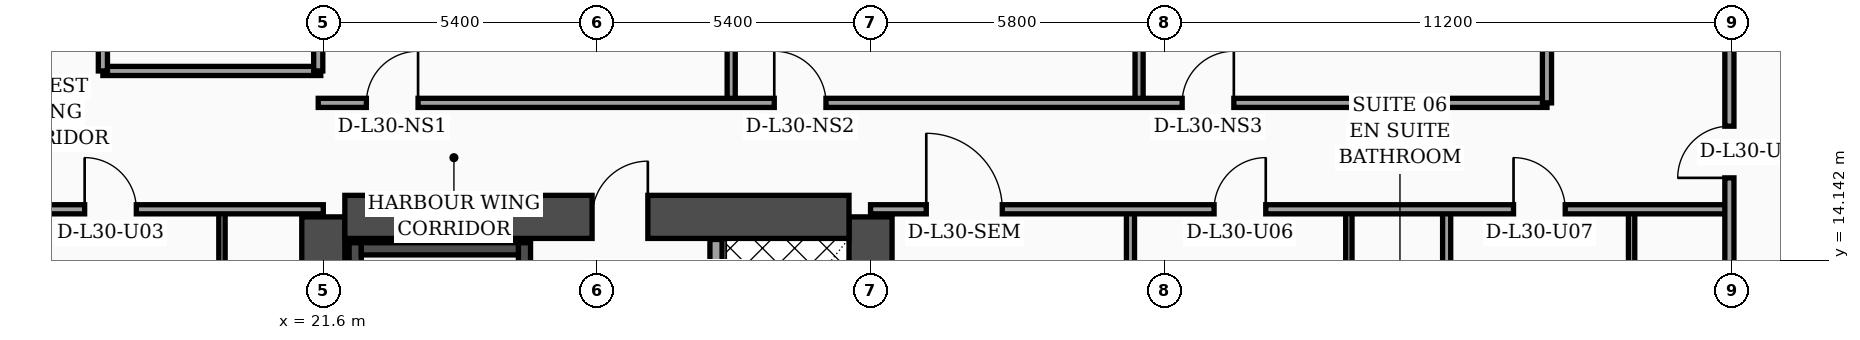
"""IFC4 building model, lengths in metres.
Left out: names, types, materials, properties, quantities, classifications, styles, units other than length and angle.
Written with IfcOpenShell. Run it as: python <this file> out.ifc"""

import sys

from ifc_helpers import new_model, si_unit, direction, frame, frame_2d, origin, place, context, subcontext, project, spatial, rectangle, extrude, element, fill, save


model = new_model("IFC4")
c1 = context("Model", 3, precision=1e-05, world=origin(), true_north=direction((0.0, 1.0)))
c2 = subcontext(c1, "Body", "Model", "MODEL_VIEW")
j1 = project(units=[si_unit("LENGTHUNIT", "METRE"), si_unit("PLANEANGLEUNIT", "RADIAN")], contexts=[c1])
p1 = place(None, origin())
s1 = spatial("IfcSite", under=j1, at=p1, CompositionType="ELEMENT")
p2 = place(p1, origin())
s2 = spatial("IfcBuilding", under=s1, at=p2, CompositionType="ELEMENT")
p3 = place(p2, frame((0.0, 0.0, 124.0)))
s3 = spatial("IfcBuildingStorey", under=s2, at=p3, CompositionType="ELEMENT", Elevation=124.0)
for number, where, z_axis, x_axis in (
    (1, (21.6, 4.6, 0.0), (0.0, 0.0, 1.0), (0.0, 1.0, 0.0)),
    (2, (32.4, 4.6, 0.0), (0.0, 0.0, 1.0), (0.0, 1.0, 0.0)),
):
    element("IfcWall", number, at=place(p3, frame(where, z_axis=z_axis, x_axis=x_axis)), inside=s3, PredefinedType="SHEAR", context=c2, shape_type="SweptSolid", body=[
        extrude(rectangle(XDim=10.4, YDim=0.85, at=frame_2d((5.2, 0.0))), origin(), (0.0, 0.0, 1.0), 3.56),
    ])
p4 = place(p3, frame((22.025, 15.0, 0.0), z_axis=(0.0, 0.0, 1.0), x_axis=(1.0, 0.0, 0.0)))
e3 = element("IfcWall", 3, at=p4, inside=s3, PredefinedType="SHEAR", context=c2, shape_type="SweptSolid", body=[
    extrude(rectangle(XDim=9.95, YDim=0.85, at=frame_2d((4.975, 0.0))), origin(), (0.0, 0.0, 1.0), 3.56),
])
p5 = place(p4, frame((4.88, 0.0, 0.0)))
e4 = element("IfcOpeningElement", 4, at=p5, cuts=e3, PredefinedType="OPENING", context=c2, shape_type="SweptSolid", body=[
    extrude(rectangle(XDim=1.1, YDim=2.2, at=frame_2d((0.55, 1.1))), frame((0.0, 0.435, 0.0), z_axis=(0.0, -1.0, 0.0), x_axis=(1.0, 0.0, 0.0)), (0.0, 0.0, 1.0), 0.87),
])
p6 = place(p3, frame((22.23, 5.025, 0.0), z_axis=(0.0, 0.0, 1.0), x_axis=(0.0, 1.0, 0.0)))
e5 = element("IfcWall", 5, at=p6, inside=s3, PredefinedType="SOLIDWALL", context=c2, shape_type="SweptSolid", body=[
    extrude(rectangle(XDim=9.465, YDim=0.24, at=frame_2d((4.732, 0.0))), origin(), (0.0, 0.0, 1.0), 3.56),
])
p7 = place(p3, frame((25.57, 5.025, 0.0), z_axis=(0.0, 0.0, 1.0), x_axis=(0.0, 1.0, 0.0)))
e6 = element("IfcWall", 6, at=p7, inside=s3, PredefinedType="SOLIDWALL", context=c2, shape_type="SweptSolid", body=[
    extrude(rectangle(XDim=9.465, YDim=0.24, at=frame_2d((4.732, 0.0))), origin(), (0.0, 0.0, 1.0), 3.56),
])
p8 = place(p7, frame((0.35, 0.0, 0.0)))
e7 = element("IfcOpeningElement", 7, at=p8, cuts=e6, PredefinedType="OPENING", context=c2, shape_type="SweptSolid", body=[
    extrude(rectangle(XDim=1.15, YDim=2.2, at=frame_2d((0.575, 1.1))), frame((0.0, 0.13, 0.0), z_axis=(0.0, -1.0, 0.0), x_axis=(1.0, 0.0, 0.0)), (0.0, 0.0, 1.0), 0.26),
])
p9 = place(p3, frame((22.35, 14.37, 0.0), z_axis=(0.0, 0.0, 1.0), x_axis=(1.0, 0.0, 0.0)))
e8 = element("IfcWall", 8, at=p9, inside=s3, PredefinedType="SOLIDWALL", context=c2, shape_type="SweptSolid", body=[
    extrude(rectangle(XDim=3.1, YDim=0.24, at=frame_2d((1.55, 0.0))), origin(), (0.0, 0.0, 1.0), 3.56),
])
p10 = place(p3, frame((59.23, 5.505, 0.0), z_axis=(0.0, 0.0, 1.0), x_axis=(-0.300509063924, 0.953778958931, 0.0)))
e9 = element("IfcWall", 9, at=p10, inside=s3, PredefinedType="SOLIDWALL", context=c2, shape_type="SweptSolid", body=[
    extrude(rectangle(XDim=30.814, YDim=0.32, at=frame_2d((15.407, 0.0))), origin(), (0.0, 0.0, 1.0), 3.56),
])
p11 = place(p10, frame((4.747, 0.0, 0.0)))
e10 = element("IfcOpeningElement", 10, at=p11, cuts=e9, PredefinedType="OPENING", context=c2, shape_type="SweptSolid", body=[
    extrude(rectangle(XDim=1.4, YDim=2.25, at=frame_2d((0.7, 1.125))), frame((0.0, 0.17, 0.0), z_axis=(0.0, -1.0, 0.0), x_axis=(1.0, 0.0, 0.0)), (0.0, 0.0, 1.0), 0.34),
])
p12 = place(p10, frame((2.65, 0.0, 0.75)))
e11 = element("IfcOpeningElement", 11, at=p12, cuts=e9, PredefinedType="OPENING", context=c2, shape_type="SweptSolid", body=[
    extrude(rectangle(XDim=1.5, YDim=1.6, at=frame_2d((0.75, 0.8))), frame((0.0, 0.17, 0.0), z_axis=(0.0, -1.0, 0.0), x_axis=(1.0, 0.0, 0.0)), (0.0, 0.0, 1.0), 0.34),
])
p13 = place(p10, frame((7.8, 0.0, 0.75)))
e12 = element("IfcOpeningElement", 12, at=p13, cuts=e9, PredefinedType="OPENING", context=c2, shape_type="SweptSolid", body=[
    extrude(rectangle(XDim=1.5, YDim=1.6, at=frame_2d((0.75, 0.8))), frame((0.0, 0.17, 0.0), z_axis=(0.0, -1.0, 0.0), x_axis=(1.0, 0.0, 0.0)), (0.0, 0.0, 1.0), 0.34),
])
p14 = place(p10, frame((10.9, 0.0, 0.75)))
e13 = element("IfcOpeningElement", 13, at=p14, cuts=e9, PredefinedType="OPENING", context=c2, shape_type="SweptSolid", body=[
    extrude(rectangle(XDim=1.5, YDim=1.6, at=frame_2d((0.75, 0.8))), frame((0.0, 0.17, 0.0), z_axis=(0.0, -1.0, 0.0), x_axis=(1.0, 0.0, 0.0)), (0.0, 0.0, 1.0), 0.34),
])
p15 = place(p10, frame((14.0, 0.0, 0.75)))
e14 = element("IfcOpeningElement", 14, at=p15, cuts=e9, PredefinedType="OPENING", context=c2, shape_type="SweptSolid", body=[
    extrude(rectangle(XDim=1.5, YDim=1.6, at=frame_2d((0.75, 0.8))), frame((0.0, 0.17, 0.0), z_axis=(0.0, -1.0, 0.0), x_axis=(1.0, 0.0, 0.0)), (0.0, 0.0, 1.0), 0.34),
])
p16 = place(p10, frame((17.1, 0.0, 0.75)))
e15 = element("IfcOpeningElement", 15, at=p16, cuts=e9, PredefinedType="OPENING", context=c2, shape_type="SweptSolid", body=[
    extrude(rectangle(XDim=1.5, YDim=1.6, at=frame_2d((0.75, 0.8))), frame((0.0, 0.17, 0.0), z_axis=(0.0, -1.0, 0.0), x_axis=(1.0, 0.0, 0.0)), (0.0, 0.0, 1.0), 0.34),
])
p17 = place(p10, frame((20.2, 0.0, 0.75)))
e16 = element("IfcOpeningElement", 16, at=p17, cuts=e9, PredefinedType="OPENING", context=c2, shape_type="SweptSolid", body=[
    extrude(rectangle(XDim=1.5, YDim=1.6, at=frame_2d((0.75, 0.8))), frame((0.0, 0.17, 0.0), z_axis=(0.0, -1.0, 0.0), x_axis=(1.0, 0.0, 0.0)), (0.0, 0.0, 1.0), 0.34),
])
p18 = place(p10, frame((23.3, 0.0, 0.75)))
e17 = element("IfcOpeningElement", 17, at=p18, cuts=e9, PredefinedType="OPENING", context=c2, shape_type="SweptSolid", body=[
    extrude(rectangle(XDim=1.5, YDim=1.6, at=frame_2d((0.75, 0.8))), frame((0.0, 0.17, 0.0), z_axis=(0.0, -1.0, 0.0), x_axis=(1.0, 0.0, 0.0)), (0.0, 0.0, 1.0), 0.34),
])
p19 = place(p10, frame((26.4, 0.0, 0.75)))
e18 = element("IfcOpeningElement", 18, at=p19, cuts=e9, PredefinedType="OPENING", context=c2, shape_type="SweptSolid", body=[
    extrude(rectangle(XDim=1.5, YDim=1.6, at=frame_2d((0.75, 0.8))), frame((0.0, 0.17, 0.0), z_axis=(0.0, -1.0, 0.0), x_axis=(1.0, 0.0, 0.0)), (0.0, 0.0, 1.0), 0.34),
])
p20 = place(p3, frame((29.35, 5.045, 0.0), z_axis=(0.0, 0.0, 1.0), x_axis=(0.0, 1.0, 0.0)))
e19 = element("IfcWall", 19, at=p20, inside=s3, PredefinedType="SOLIDWALL", context=c2, shape_type="SweptSolid", body=[
    extrude(rectangle(XDim=9.51, YDim=0.24, at=frame_2d((4.755, 0.0))), origin(), (0.0, 0.0, 1.0), 3.56),
])
p21 = place(p20, frame((0.55, 0.0, 0.0)))
e20 = element("IfcOpeningElement", 20, at=p21, cuts=e19, PredefinedType="OPENING", context=c2, shape_type="SweptSolid", body=[
    extrude(rectangle(XDim=1.3, YDim=2.35, at=frame_2d((0.65, 1.175))), frame((0.0, 0.13, 0.0), z_axis=(0.0, -1.0, 0.0), x_axis=(1.0, 0.0, 0.0)), (0.0, 0.0, 1.0), 0.26),
])
p22 = place(p3, frame((19.6, 2.44, 0.0), z_axis=(0.0, 0.0, 1.0), x_axis=(0.0, 1.0, 0.0)))
e21 = element("IfcWall", 21, at=p22, inside=s3, PredefinedType="PARTITIONING", context=c2, shape_type="SweptSolid", body=[
    extrude(rectangle(XDim=12.71, YDim=0.125, at=frame_2d((6.355, 0.0))), origin(), (0.0, 0.0, 1.0), 2.49),
])
p23 = place(p22, frame((4.34, 0.0, 0.0)))
e22 = element("IfcOpeningElement", 22, at=p23, cuts=e21, PredefinedType="OPENING", context=c2, shape_type="SweptSolid", body=[
    extrude(rectangle(XDim=0.96, YDim=2.2, at=frame_2d((0.48, 1.1))), frame((0.0, 0.073, 0.0), z_axis=(0.0, -1.0, 0.0), x_axis=(1.0, 0.0, 0.0)), (0.0, 0.0, 1.0), 0.145),
])
p24 = place(p22, frame((10.18, 0.0, 0.0)))
e23 = element("IfcOpeningElement", 23, at=p24, cuts=e21, PredefinedType="OPENING", context=c2, shape_type="SweptSolid", body=[
    extrude(rectangle(XDim=0.9, YDim=2.15, at=frame_2d((0.45, 1.075))), frame((0.0, 0.073, 0.0), z_axis=(0.0, -1.0, 0.0), x_axis=(1.0, 0.0, 0.0)), (0.0, 0.0, 1.0), 0.145),
])
p25 = place(p3, frame((15.15, 15.15, 0.0), z_axis=(0.0, 0.0, 1.0), x_axis=(1.0, 0.0, 0.0)))
e24 = element("IfcWall", 24, at=p25, inside=s3, PredefinedType="PARTITIONING", context=c2, shape_type="SweptSolid", body=[
    extrude(rectangle(XDim=6.45, YDim=0.18, at=frame_2d((3.225, 0.0))), origin(), (0.0, 0.0, 1.0), 2.49),
])
p26 = place(p25, frame((1.74, 0.0, 0.0)))
e25 = element("IfcOpeningElement", 25, at=p26, cuts=e24, PredefinedType="OPENING", context=c2, shape_type="SweptSolid", body=[
    extrude(rectangle(XDim=1.02, YDim=2.2, at=frame_2d((0.51, 1.1))), frame((0.0, 0.1, 0.0), z_axis=(0.0, -1.0, 0.0), x_axis=(1.0, 0.0, 0.0)), (0.0, 0.0, 1.0), 0.2),
])
p27 = place(p3, frame((17.25, 17.88, 0.0), z_axis=(0.0, 0.0, 1.0), x_axis=(1.0, 0.0, 0.0)))
e26 = element("IfcWall", 26, at=p27, inside=s3, PredefinedType="PARTITIONING", context=c2, shape_type="SweptSolid", body=[
    extrude(rectangle(XDim=4.3, YDim=0.18, at=frame_2d((2.15, 0.0))), origin(), (0.0, 0.0, 1.0), 3.09),
])
p28 = place(p3, frame((21.5, 17.88, 0.0), z_axis=(0.0, 0.0, 1.0), x_axis=(0.0, 1.0, 0.0)))
e27 = element("IfcWall", 27, at=p28, inside=s3, PredefinedType="PARTITIONING", context=c2, shape_type="SweptSolid", body=[
    extrude(rectangle(XDim=6.44, YDim=0.18, at=frame_2d((3.22, 0.0))), origin(), (0.0, 0.0, 1.0), 3.09),
])
p29 = place(p3, frame((17.25, 17.88, 0.0), z_axis=(0.0, 0.0, 1.0), x_axis=(0.0, 1.0, 0.0)))
e28 = element("IfcWall", 28, at=p29, inside=s3, PredefinedType="PARTITIONING", context=c2, shape_type="SweptSolid", body=[
    extrude(rectangle(XDim=6.44, YDim=0.18, at=frame_2d((3.22, 0.0))), origin(), (0.0, 0.0, 1.0), 3.09),
])
p30 = place(p29, frame((0.65, 0.0, 0.0)))
e29 = element("IfcOpeningElement", 29, at=p30, cuts=e28, PredefinedType="OPENING", context=c2, shape_type="SweptSolid", body=[
    extrude(rectangle(XDim=0.98, YDim=2.15, at=frame_2d((0.49, 1.075))), frame((0.0, 0.1, 0.0), z_axis=(0.0, -1.0, 0.0), x_axis=(1.0, 0.0, 0.0)), (0.0, 0.0, 1.0), 0.2),
])
p31 = place(p29, frame((3.27, 0.0, 0.0)))
e30 = element("IfcOpeningElement", 30, at=p31, cuts=e28, PredefinedType="OPENING", context=c2, shape_type="SweptSolid", body=[
    extrude(rectangle(XDim=0.96, YDim=2.2, at=frame_2d((0.48, 1.1))), frame((0.0, 0.1, 0.0), z_axis=(0.0, -1.0, 0.0), x_axis=(1.0, 0.0, 0.0)), (0.0, 0.0, 1.0), 0.2),
])
p32 = place(p3, frame((41.84, 2.44, 0.0), z_axis=(0.0, 0.0, 1.0), x_axis=(0.0, 1.0, 0.0)))
e31 = element("IfcWall", 31, at=p32, inside=s3, PredefinedType="PARTITIONING", context=c2, shape_type="SweptSolid", body=[
    extrude(rectangle(XDim=12.71, YDim=0.125, at=frame_2d((6.355, 0.0))), origin(), (0.0, 0.0, 1.0), 3.04),
])
p33 = place(p32, frame((4.35, 0.0, 0.0)))
e32 = element("IfcOpeningElement", 32, at=p33, cuts=e31, PredefinedType="OPENING", context=c2, shape_type="SweptSolid", body=[
    extrude(rectangle(XDim=0.96, YDim=2.2, at=frame_2d((0.48, 1.1))), frame((0.0, 0.073, 0.0), z_axis=(0.0, -1.0, 0.0), x_axis=(1.0, 0.0, 0.0)), (0.0, 0.0, 1.0), 0.145),
])
p34 = place(p32, frame((10.21, 0.0, 0.0)))
e33 = element("IfcOpeningElement", 33, at=p34, cuts=e31, PredefinedType="OPENING", context=c2, shape_type="SweptSolid", body=[
    extrude(rectangle(XDim=0.9, YDim=2.15, at=frame_2d((0.45, 1.075))), frame((0.0, 0.073, 0.0), z_axis=(0.0, -1.0, 0.0), x_axis=(1.0, 0.0, 0.0)), (0.0, 0.0, 1.0), 0.145),
])
p35 = place(p3, frame((37.53, 2.44, 0.0), z_axis=(0.0, 0.0, 1.0), x_axis=(0.0, 1.0, 0.0)))
e34 = element("IfcWall", 34, at=p35, inside=s3, PredefinedType="PARTITIONING", context=c2, shape_type="SweptSolid", body=[
    extrude(rectangle(XDim=12.71, YDim=0.16, at=frame_2d((6.355, 0.0))), origin(), (0.0, 0.0, 1.0), 2.84),
])
p36 = place(p3, frame((47.42, 2.44, 0.0), z_axis=(0.0, 0.0, 1.0), x_axis=(0.0, 1.0, 0.0)))
e35 = element("IfcWall", 35, at=p36, inside=s3, PredefinedType="PARTITIONING", context=c2, shape_type="SweptSolid", body=[
    extrude(rectangle(XDim=12.71, YDim=0.125, at=frame_2d((6.355, 0.0))), origin(), (0.0, 0.0, 1.0), 2.84),
])
p37 = place(p36, frame((4.35, 0.0, 0.0)))
e36 = element("IfcOpeningElement", 36, at=p37, cuts=e35, PredefinedType="OPENING", context=c2, shape_type="SweptSolid", body=[
    extrude(rectangle(XDim=0.96, YDim=2.2, at=frame_2d((0.48, 1.1))), frame((0.0, 0.073, 0.0), z_axis=(0.0, -1.0, 0.0), x_axis=(1.0, 0.0, 0.0)), (0.0, 0.0, 1.0), 0.145),
])
p38 = place(p36, frame((10.21, 0.0, 0.0)))
e37 = element("IfcOpeningElement", 37, at=p38, cuts=e35, PredefinedType="OPENING", context=c2, shape_type="SweptSolid", body=[
    extrude(rectangle(XDim=0.9, YDim=2.15, at=frame_2d((0.45, 1.075))), frame((0.0, 0.073, 0.0), z_axis=(0.0, -1.0, 0.0), x_axis=(1.0, 0.0, 0.0)), (0.0, 0.0, 1.0), 0.145),
])
p39 = place(p3, frame((43.77, 2.44, 0.0), z_axis=(0.0, 0.0, 1.0), x_axis=(0.0, 1.0, 0.0)))
e38 = element("IfcWall", 38, at=p39, inside=s3, PredefinedType="PARTITIONING", context=c2, shape_type="SweptSolid", body=[
    extrude(rectangle(XDim=12.71, YDim=0.16, at=frame_2d((6.355, 0.0))), origin(), (0.0, 0.0, 1.0), 3.04),
])
p40 = place(p3, frame((32.4, 15.15, 0.0), z_axis=(0.0, 0.0, 1.0), x_axis=(1.0, 0.0, 0.0)))
e39 = element("IfcWall", 39, at=p40, inside=s3, PredefinedType="PARTITIONING", context=c2, shape_type="SweptSolid", body=[
    extrude(rectangle(XDim=16.95, YDim=0.18, at=frame_2d((8.475, 0.0))), origin(), (0.0, 0.0, 1.0), 2.84),
])
p41 = place(p40, frame((1.1, 0.0, 0.0)))
e40 = element("IfcOpeningElement", 40, at=p41, cuts=e39, PredefinedType="OPENING", context=c2, shape_type="SweptSolid", body=[
    extrude(rectangle(XDim=1.5, YDim=2.22, at=frame_2d((0.75, 1.11))), frame((0.0, 0.1, 0.0), z_axis=(0.0, -1.0, 0.0), x_axis=(1.0, 0.0, 0.0)), (0.0, 0.0, 1.0), 0.2),
])
p42 = place(p40, frame((6.78, 0.0, 0.0)))
e41 = element("IfcOpeningElement", 41, at=p42, cuts=e39, PredefinedType="OPENING", context=c2, shape_type="SweptSolid", body=[
    extrude(rectangle(XDim=1.02, YDim=2.2, at=frame_2d((0.51, 1.1))), frame((0.0, 0.1, 0.0), z_axis=(0.0, -1.0, 0.0), x_axis=(1.0, 0.0, 0.0)), (0.0, 0.0, 1.0), 0.2),
])
p43 = place(p40, frame((12.69, 0.0, 0.0)))
e42 = element("IfcOpeningElement", 42, at=p43, cuts=e39, PredefinedType="OPENING", context=c2, shape_type="SweptSolid", body=[
    extrude(rectangle(XDim=1.02, YDim=2.2, at=frame_2d((0.51, 1.1))), frame((0.0, 0.1, 0.0), z_axis=(0.0, -1.0, 0.0), x_axis=(1.0, 0.0, 0.0)), (0.0, 0.0, 1.0), 0.2),
])
p44 = place(p3, frame((29.65, 17.25, 0.0), z_axis=(0.0, 0.0, 1.0), x_axis=(0.0, 1.0, 0.0)))
e43 = element("IfcWall", 43, at=p44, inside=s3, PredefinedType="PARTITIONING", context=c2, shape_type="SweptSolid", body=[
    extrude(rectangle(XDim=11.72, YDim=0.16, at=frame_2d((5.86, 0.0))), origin(), (0.0, 0.0, 1.0), 2.84),
])
p45 = place(p3, frame((37.7, 17.25, 0.0), z_axis=(0.0, 0.0, 1.0), x_axis=(0.0, 1.0, 0.0)))
e44 = element("IfcWall", 44, at=p45, inside=s3, PredefinedType="PARTITIONING", context=c2, shape_type="SweptSolid", body=[
    extrude(rectangle(XDim=16.2, YDim=0.16, at=frame_2d((8.1, 0.0))), origin(), (0.0, 0.0, 1.0), 2.84),
])
p46 = place(p3, frame((21.5, 17.25, 0.0), z_axis=(0.0, 0.0, 1.0), x_axis=(1.0, 0.0, 0.0)))
e45 = element("IfcWall", 45, at=p46, inside=s3, PredefinedType="PARTITIONING", context=c2, shape_type="SweptSolid", body=[
    extrude(rectangle(XDim=24.25, YDim=0.18, at=frame_2d((12.125, 0.0))), origin(), (0.0, 0.0, 1.0), 2.84),
])
p47 = place(p46, frame((0.95, 0.0, 0.0)))
e46 = element("IfcOpeningElement", 46, at=p47, cuts=e45, PredefinedType="OPENING", context=c2, shape_type="SweptSolid", body=[
    extrude(rectangle(XDim=1.02, YDim=2.2, at=frame_2d((0.51, 1.1))), frame((0.0, 0.1, 0.0), z_axis=(0.0, -1.0, 0.0), x_axis=(1.0, 0.0, 0.0)), (0.0, 0.0, 1.0), 0.2),
])
p48 = place(p46, frame((9.0, 0.0, 0.0)))
e47 = element("IfcOpeningElement", 47, at=p48, cuts=e45, PredefinedType="OPENING", context=c2, shape_type="SweptSolid", body=[
    extrude(rectangle(XDim=1.02, YDim=2.2, at=frame_2d((0.51, 1.1))), frame((0.0, 0.1, 0.0), z_axis=(0.0, -1.0, 0.0), x_axis=(1.0, 0.0, 0.0)), (0.0, 0.0, 1.0), 0.2),
])
p49 = place(p46, frame((17.05, 0.0, 0.0)))
e48 = element("IfcOpeningElement", 48, at=p49, cuts=e45, PredefinedType="OPENING", context=c2, shape_type="SweptSolid", body=[
    extrude(rectangle(XDim=1.02, YDim=2.2, at=frame_2d((0.51, 1.1))), frame((0.0, 0.1, 0.0), z_axis=(0.0, -1.0, 0.0), x_axis=(1.0, 0.0, 0.0)), (0.0, 0.0, 1.0), 0.2),
])
p50 = place(p3, frame((45.75, 17.25, 0.0), z_axis=(0.0, 0.0, 1.0), x_axis=(0.0, 1.0, 0.0)))
e49 = element("IfcWall", 49, at=p50, inside=s3, PredefinedType="PARTITIONING", context=c2, shape_type="SweptSolid", body=[
    extrude(rectangle(XDim=20.69, YDim=0.18, at=frame_2d((10.345, 0.0))), origin(), (0.0, 0.0, 1.0), 2.84),
])
p51 = place(p3, frame((49.35, 2.44, 0.0), z_axis=(0.0, 0.0, 1.0), x_axis=(0.0, 1.0, 0.0)))
e50 = element("IfcWall", 50, at=p51, inside=s3, PredefinedType="PARTITIONING", context=c2, shape_type="SweptSolid", body=[
    extrude(rectangle(XDim=18.36, YDim=0.18, at=frame_2d((9.18, 0.0))), origin(), (0.0, 0.0, 1.0), 2.84),
])
p52 = place(p51, frame((13.33, 0.0, 0.0)))
e51 = element("IfcOpeningElement", 51, at=p52, cuts=e50, PredefinedType="OPENING", context=c2, shape_type="SweptSolid", body=[
    extrude(rectangle(XDim=1.02, YDim=2.2, at=frame_2d((0.51, 1.1))), frame((0.0, 0.1, 0.0), z_axis=(0.0, -1.0, 0.0), x_axis=(1.0, 0.0, 0.0)), (0.0, 0.0, 1.0), 0.2),
])
p53 = place(p26, origin())
e52 = element("IfcDoor", 52, at=p53, inside=s3, OperationType="SINGLE_SWING_LEFT", PredefinedType="DOOR", context=c2, shape_type="SweptSolid", body=[
    extrude(rectangle(XDim=1.02, YDim=2.2, at=frame_2d((0.51, 1.1))), frame((0.0, 0.025, 0.0), z_axis=(0.0, -1.0, 0.0), x_axis=(1.0, 0.0, 0.0)), (0.0, 0.0, 1.0), 0.05),
])
fill(e25, e52)
p54 = place(p41, origin())
e53 = element("IfcDoor", 53, at=p54, inside=s3, OperationType="SINGLE_SWING_LEFT", PredefinedType="DOOR", context=c2, shape_type="SweptSolid", body=[
    extrude(rectangle(XDim=1.5, YDim=2.22, at=frame_2d((0.75, 1.11))), frame((0.0, 0.025, 0.0), z_axis=(0.0, -1.0, 0.0), x_axis=(1.0, 0.0, 0.0)), (0.0, 0.0, 1.0), 0.05),
])
fill(e40, e53)
p55 = place(p42, origin())
e54 = element("IfcDoor", 54, at=p55, inside=s3, OperationType="SINGLE_SWING_RIGHT", PredefinedType="DOOR", context=c2, shape_type="SweptSolid", body=[
    extrude(rectangle(XDim=1.02, YDim=2.2, at=frame_2d((0.51, 1.1))), frame((0.0, 0.025, 0.0), z_axis=(0.0, -1.0, 0.0), x_axis=(1.0, 0.0, 0.0)), (0.0, 0.0, 1.0), 0.05),
])
fill(e41, e54)
p56 = place(p43, origin())
e55 = element("IfcDoor", 55, at=p56, inside=s3, OperationType="SINGLE_SWING_LEFT", PredefinedType="DOOR", context=c2, shape_type="SweptSolid", body=[
    extrude(rectangle(XDim=1.02, YDim=2.2, at=frame_2d((0.51, 1.1))), frame((0.0, 0.025, 0.0), z_axis=(0.0, -1.0, 0.0), x_axis=(1.0, 0.0, 0.0)), (0.0, 0.0, 1.0), 0.05),
])
fill(e42, e55)
p57 = place(p47, origin())
e56 = element("IfcDoor", 56, at=p57, inside=s3, OperationType="SINGLE_SWING_RIGHT", PredefinedType="DOOR", context=c2, shape_type="SweptSolid", body=[
    extrude(rectangle(XDim=1.02, YDim=2.2, at=frame_2d((0.51, 1.1))), frame((0.0, 0.025, 0.0), z_axis=(0.0, -1.0, 0.0), x_axis=(1.0, 0.0, 0.0)), (0.0, 0.0, 1.0), 0.05),
])
fill(e46, e56)
p58 = place(p48, origin())
e57 = element("IfcDoor", 57, at=p58, inside=s3, OperationType="SINGLE_SWING_LEFT", PredefinedType="DOOR", context=c2, shape_type="SweptSolid", body=[
    extrude(rectangle(XDim=1.02, YDim=2.2, at=frame_2d((0.51, 1.1))), frame((0.0, 0.025, 0.0), z_axis=(0.0, -1.0, 0.0), x_axis=(1.0, 0.0, 0.0)), (0.0, 0.0, 1.0), 0.05),
])
fill(e47, e57)
p59 = place(p49, origin())
e58 = element("IfcDoor", 58, at=p59, inside=s3, OperationType="SINGLE_SWING_RIGHT", PredefinedType="DOOR", context=c2, shape_type="SweptSolid", body=[
    extrude(rectangle(XDim=1.02, YDim=2.2, at=frame_2d((0.51, 1.1))), frame((0.0, 0.025, 0.0), z_axis=(0.0, -1.0, 0.0), x_axis=(1.0, 0.0, 0.0)), (0.0, 0.0, 1.0), 0.05),
])
fill(e48, e58)
p60 = place(p52, origin())
e59 = element("IfcDoor", 59, at=p60, inside=s3, OperationType="SINGLE_SWING_LEFT", PredefinedType="DOOR", context=c2, shape_type="SweptSolid", body=[
    extrude(rectangle(XDim=1.02, YDim=2.2, at=frame_2d((0.51, 1.1))), frame((0.0, 0.025, 0.0), z_axis=(0.0, -1.0, 0.0), x_axis=(1.0, 0.0, 0.0)), (0.0, 0.0, 1.0), 0.05),
])
fill(e51, e59)
p61 = place(p5, origin())
e60 = element("IfcDoor", 60, at=p61, inside=s3, OperationType="SINGLE_SWING_RIGHT", PredefinedType="DOOR", context=c2, shape_type="SweptSolid", body=[
    extrude(rectangle(XDim=1.1, YDim=2.2, at=frame_2d((0.55, 1.1))), frame((0.0, 0.025, 0.0), z_axis=(0.0, -1.0, 0.0), x_axis=(1.0, 0.0, 0.0)), (0.0, 0.0, 1.0), 0.05),
])
fill(e4, e60)
save(model, sys.argv[1])
